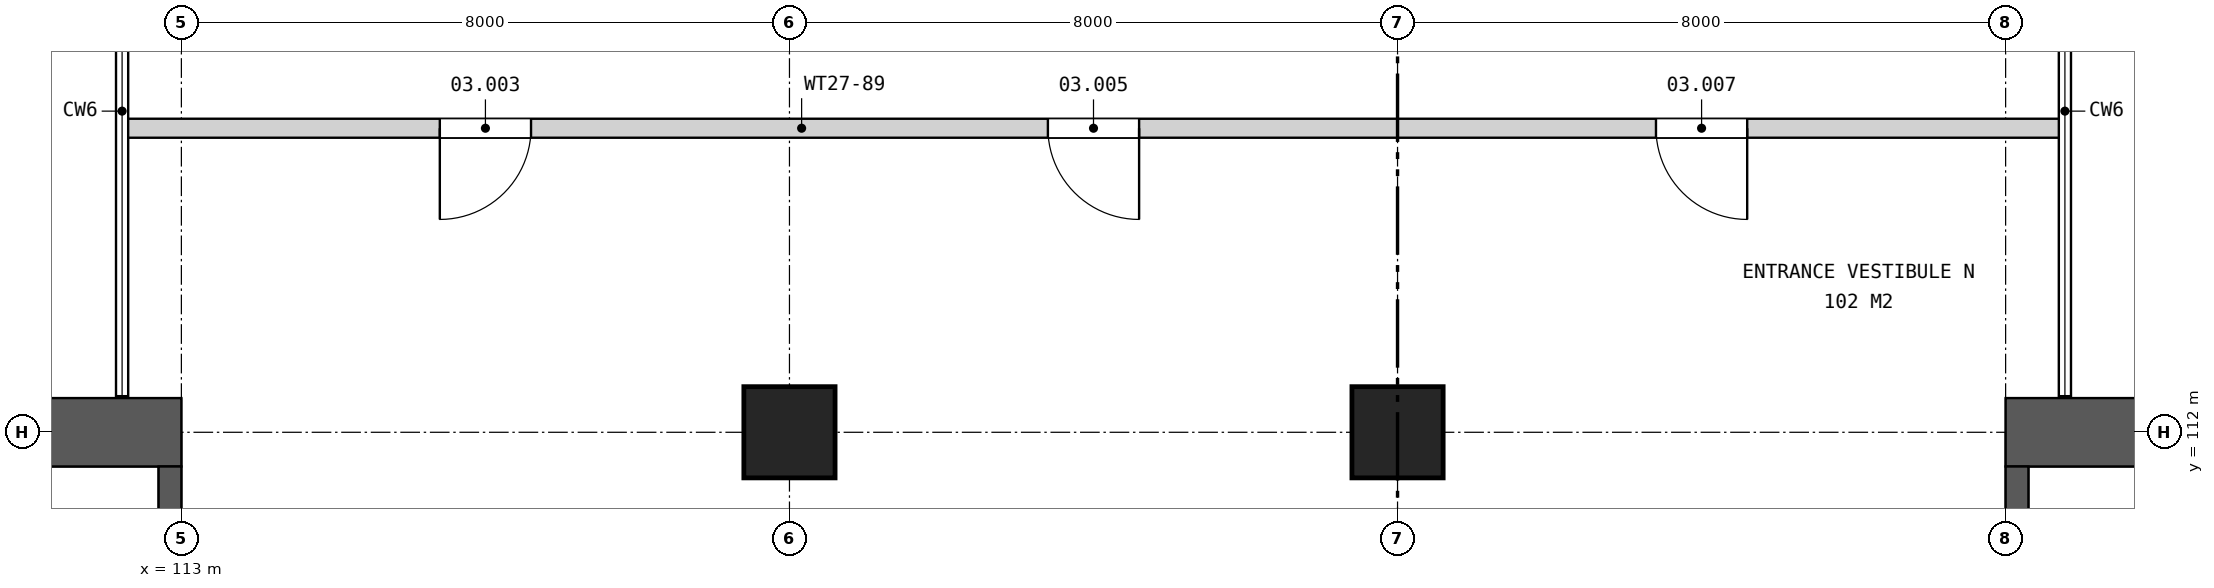
"""IFC4 building model, lengths in metres.
Left out: names, types, materials, properties, quantities, classifications, styles, units other than length and angle.
Written with IfcOpenShell. Run it as: python <this file> out.ifc"""

import sys

from ifc_helpers import new_model, si_unit, direction, frame, frame_2d, origin, origin_2d, place, context, subcontext, project, spatial, rectangle, extrude, element, fill, save


model = new_model("IFC4")
c1 = context("Model", 3, precision=1e-05, world=origin(), true_north=direction((0.0, 1.0)))
c2 = subcontext(c1, "Body", "Model", "MODEL_VIEW")
j1 = project(units=[si_unit("LENGTHUNIT", "METRE"), si_unit("PLANEANGLEUNIT", "RADIAN")], contexts=[c1])
p1 = place(None, origin())
s1 = spatial("IfcSite", under=j1, at=p1, CompositionType="ELEMENT")
p2 = place(p1, origin())
s2 = spatial("IfcBuilding", under=s1, at=p2, CompositionType="ELEMENT")
p3 = place(p2, frame((0.0, 0.0, 25.0)))
s3 = spatial("IfcBuildingStorey", under=s2, at=p3, CompositionType="ELEMENT", Elevation=25.0)
for number, where, z_axis, x_axis in (
    (1, (121.0, 112.0, 0.0), (0.0, 0.0, 1.0), (1.0, 0.0, 0.0)),
    (2, (129.0, 112.0, 0.0), (0.0, 0.0, 1.0), (1.0, 0.0, 0.0)),
):
    element("IfcColumn", number, at=place(p3, frame(where, z_axis=z_axis, x_axis=x_axis)), inside=s3, PredefinedType="COLUMN", context=c2, shape_type="SweptSolid", body=[
        extrude(rectangle(XDim=1.2, YDim=1.2, at=origin_2d()), origin(), (0.0, 0.0, 1.0), 9.0),
    ])
p4 = place(p3, frame((137.0, 112.0, 0.0), z_axis=(0.0, 0.0, 1.0), x_axis=(1.0, 0.0, 0.0)))
e3 = element("IfcWall", 3, at=p4, inside=s3, PredefinedType="SHEAR", context=c2, shape_type="SweptSolid", body=[
    extrude(rectangle(XDim=7.1, YDim=0.9, at=frame_2d((3.55, 0.0))), origin(), (0.0, 0.0, 1.0), 9.0),
])
p5 = place(p3, frame((137.15, 105.7, 0.0), z_axis=(0.0, 0.0, 1.0), x_axis=(0.0, 1.0, 0.0)))
e4 = element("IfcWall", 4, at=p5, inside=s3, PredefinedType="SHEAR", context=c2, shape_type="SweptSolid", body=[
    extrude(rectangle(XDim=5.85, YDim=0.3, at=frame_2d((2.925, 0.0))), origin(), (0.0, 0.0, 1.0), 9.0),
])
p6 = place(p3, frame((113.0, 112.0, 0.0), z_axis=(0.0, 0.0, 1.0), x_axis=(-1.0, 0.0, 0.0)))
e5 = element("IfcWall", 5, at=p6, inside=s3, PredefinedType="SHEAR", context=c2, shape_type="SweptSolid", body=[
    extrude(rectangle(XDim=7.1, YDim=0.9, at=frame_2d((3.55, 0.0))), origin(), (0.0, 0.0, 1.0), 9.0),
])
p7 = place(p3, frame((112.85, 111.55, 0.0), z_axis=(0.0, 0.0, 1.0), x_axis=(0.0, -1.0, 0.0)))
e6 = element("IfcWall", 6, at=p7, inside=s3, PredefinedType="SHEAR", context=c2, shape_type="SweptSolid", body=[
    extrude(rectangle(XDim=5.85, YDim=0.3, at=frame_2d((2.925, 0.0))), origin(), (0.0, 0.0, 1.0), 9.0),
])
p8 = place(p3, frame((112.2, 116.0, 0.0), z_axis=(0.0, 0.0, 1.0), x_axis=(1.0, 0.0, 0.0)))
e7 = element("IfcWall", 7, at=p8, inside=s3, PredefinedType="PARTITIONING", context=c2, shape_type="SweptSolid", body=[
    extrude(rectangle(XDim=25.6, YDim=0.25, at=frame_2d((12.8, 0.0))), origin(), (0.0, 0.0, 1.0), 8.132),
])
p9 = place(p8, frame((4.2, 0.0, 0.0)))
e8 = element("IfcOpeningElement", 8, at=p9, cuts=e7, PredefinedType="OPENING", context=c2, shape_type="SweptSolid", body=[
    extrude(rectangle(XDim=1.2, YDim=2.2, at=frame_2d((0.6, 1.1))), frame((0.0, 0.135, 0.0), z_axis=(0.0, -1.0, 0.0), x_axis=(1.0, 0.0, 0.0)), (0.0, 0.0, 1.0), 0.27),
])
p10 = place(p8, frame((12.2, 0.0, 0.0)))
e9 = element("IfcOpeningElement", 9, at=p10, cuts=e7, PredefinedType="OPENING", context=c2, shape_type="SweptSolid", body=[
    extrude(rectangle(XDim=1.2, YDim=2.2, at=frame_2d((0.6, 1.1))), frame((0.0, 0.135, 0.0), z_axis=(0.0, -1.0, 0.0), x_axis=(1.0, 0.0, 0.0)), (0.0, 0.0, 1.0), 0.27),
])
p11 = place(p8, frame((20.2, 0.0, 0.0)))
e10 = element("IfcOpeningElement", 10, at=p11, cuts=e7, PredefinedType="OPENING", context=c2, shape_type="SweptSolid", body=[
    extrude(rectangle(XDim=1.2, YDim=2.2, at=frame_2d((0.6, 1.1))), frame((0.0, 0.135, 0.0), z_axis=(0.0, -1.0, 0.0), x_axis=(1.0, 0.0, 0.0)), (0.0, 0.0, 1.0), 0.27),
])
p12 = place(p9, frame((1.2, 0.0, 0.0), z_axis=(0.0, 0.0, 1.0), x_axis=(-1.0, 0.0, 0.0)))
e11 = element("IfcDoor", 11, at=p12, inside=s3, OperationType="SINGLE_SWING_RIGHT", PredefinedType="DOOR", context=c2, shape_type="SweptSolid", body=[
    extrude(rectangle(XDim=1.2, YDim=2.2, at=frame_2d((0.6, 1.1))), frame((0.0, 0.025, 0.0), z_axis=(0.0, -1.0, 0.0), x_axis=(1.0, 0.0, 0.0)), (0.0, 0.0, 1.0), 0.05),
])
fill(e8, e11)
p13 = place(p10, frame((1.2, 0.0, 0.0), z_axis=(0.0, 0.0, 1.0), x_axis=(-1.0, 0.0, 0.0)))
e12 = element("IfcDoor", 12, at=p13, inside=s3, OperationType="SINGLE_SWING_LEFT", PredefinedType="DOOR", context=c2, shape_type="SweptSolid", body=[
    extrude(rectangle(XDim=1.2, YDim=2.2, at=frame_2d((0.6, 1.1))), frame((0.0, 0.025, 0.0), z_axis=(0.0, -1.0, 0.0), x_axis=(1.0, 0.0, 0.0)), (0.0, 0.0, 1.0), 0.05),
])
fill(e9, e12)
p14 = place(p11, frame((1.2, 0.0, 0.0), z_axis=(0.0, 0.0, 1.0), x_axis=(-1.0, 0.0, 0.0)))
e13 = element("IfcDoor", 13, at=p14, inside=s3, OperationType="SINGLE_SWING_LEFT", PredefinedType="DOOR", context=c2, shape_type="SweptSolid", body=[
    extrude(rectangle(XDim=1.2, YDim=2.2, at=frame_2d((0.6, 1.1))), frame((0.0, 0.025, 0.0), z_axis=(0.0, -1.0, 0.0), x_axis=(1.0, 0.0, 0.0)), (0.0, 0.0, 1.0), 0.05),
])
fill(e10, e13)
save(model, sys.argv[1])
